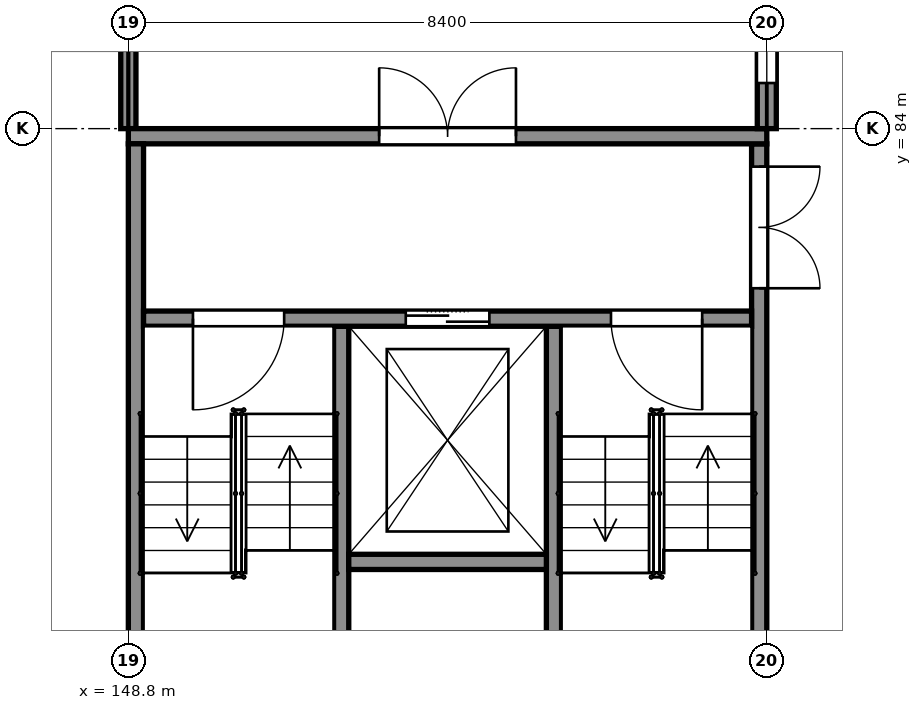
"""IFC4 building model, lengths in metres.
Left out: names, types, materials, properties, quantities, classifications, styles, units other than length and angle.
Written with IfcOpenShell. Run it as: python <this file> out.ifc"""

import sys

from ifc_helpers import new_model, si_unit, direction, frame, frame_2d, origin, place, context, subcontext, project, spatial, rectangle, extrude, element, fill, save


model = new_model("IFC4")
c1 = context("Model", 3, precision=1e-05, world=origin(), true_north=direction((0.0, 1.0)))
c2 = subcontext(c1, "Body", "Model", "MODEL_VIEW")
j1 = project(units=[si_unit("LENGTHUNIT", "METRE"), si_unit("PLANEANGLEUNIT", "RADIAN")], contexts=[c1])
p1 = place(None, origin())
s1 = spatial("IfcSite", under=j1, at=p1, CompositionType="ELEMENT")
p2 = place(p1, origin())
s2 = spatial("IfcBuilding", under=s1, at=p2, CompositionType="ELEMENT")
p3 = place(p2, origin())
s3 = spatial("IfcBuildingStorey", under=s2, at=p3, CompositionType="ELEMENT", Elevation=0.0)
p4 = place(p3, frame((148.8, 83.9, -1.8), z_axis=(0.0, 0.0, 1.0), x_axis=(1.0, 0.0, 0.0)))
e1 = element("IfcWall", 1, at=p4, inside=s3, PredefinedType="SHEAR", context=c2, shape_type="SweptSolid", body=[
    extrude(rectangle(XDim=8.4, YDim=0.2, at=frame_2d((4.2, 0.0))), origin(), (0.0, 0.0, 1.0), 7.3),
])
p5 = place(p4, frame((3.3, 0.0, 1.8)))
e2 = element("IfcOpeningElement", 2, at=p5, cuts=e1, PredefinedType="OPENING", context=c2, shape_type="SweptSolid", body=[
    extrude(rectangle(XDim=1.8, YDim=2.1, at=frame_2d((0.9, 1.05))), frame((0.0, 0.11, 0.0), z_axis=(0.0, -1.0, 0.0), x_axis=(1.0, 0.0, 0.0)), (0.0, 0.0, 1.0), 0.22),
])
p6 = place(p3, frame((148.9, 75.8, -1.8), z_axis=(0.0, 0.0, 1.0), x_axis=(0.0, 1.0, 0.0)))
e3 = element("IfcWall", 3, at=p6, inside=s3, PredefinedType="SHEAR", context=c2, shape_type="SweptSolid", body=[
    extrude(rectangle(XDim=8.0, YDim=0.2, at=frame_2d((4.0, 0.0))), origin(), (0.0, 0.0, 1.0), 7.3),
])
p7 = place(p3, frame((157.1, 83.8, -1.8), z_axis=(0.0, 0.0, 1.0), x_axis=(0.0, -1.0, 0.0)))
e4 = element("IfcWall", 4, at=p7, inside=s3, PredefinedType="SHEAR", context=c2, shape_type="SweptSolid", body=[
    extrude(rectangle(XDim=8.0, YDim=0.2, at=frame_2d((4.0, 0.0))), origin(), (0.0, 0.0, 1.0), 7.3),
])
p8 = place(p7, frame((0.3, 0.0, 1.8)))
e5 = element("IfcOpeningElement", 5, at=p8, cuts=e4, PredefinedType="OPENING", context=c2, shape_type="SweptSolid", body=[
    extrude(rectangle(XDim=1.6, YDim=2.1, at=frame_2d((0.8, 1.05))), frame((0.0, 0.11, 0.0), z_axis=(0.0, -1.0, 0.0), x_axis=(1.0, 0.0, 0.0)), (0.0, 0.0, 1.0), 0.22),
])
p9 = place(p3, frame((149.0, 81.5, -1.8), z_axis=(0.0, 0.0, 1.0), x_axis=(1.0, 0.0, 0.0)))
e6 = element("IfcWall", 6, at=p9, inside=s3, PredefinedType="SHEAR", context=c2, shape_type="SweptSolid", body=[
    extrude(rectangle(XDim=8.0, YDim=0.2, at=frame_2d((4.0, 0.0))), origin(), (0.0, 0.0, 1.0), 7.3),
])
p10 = place(p9, frame((0.65, 0.0, 1.8)))
e7 = element("IfcOpeningElement", 7, at=p10, cuts=e6, PredefinedType="OPENING", context=c2, shape_type="SweptSolid", body=[
    extrude(rectangle(XDim=1.2, YDim=2.1, at=frame_2d((0.6, 1.05))), frame((0.0, 0.11, 0.0), z_axis=(0.0, -1.0, 0.0), x_axis=(1.0, 0.0, 0.0)), (0.0, 0.0, 1.0), 0.22),
])
p11 = place(p9, frame((6.15, 0.0, 1.8)))
e8 = element("IfcOpeningElement", 8, at=p11, cuts=e6, PredefinedType="OPENING", context=c2, shape_type="SweptSolid", body=[
    extrude(rectangle(XDim=1.2, YDim=2.1, at=frame_2d((0.6, 1.05))), frame((0.0, 0.11, 0.0), z_axis=(0.0, -1.0, 0.0), x_axis=(1.0, 0.0, 0.0)), (0.0, 0.0, 1.0), 0.22),
])
p12 = place(p9, frame((3.45, 0.0, 1.8)))
e9 = element("IfcOpeningElement", 9, at=p12, cuts=e6, PredefinedType="OPENING", context=c2, shape_type="SweptSolid", body=[
    extrude(rectangle(XDim=1.1, YDim=2.1, at=frame_2d((0.55, 1.05))), frame((0.0, 0.11, 0.0), z_axis=(0.0, -1.0, 0.0), x_axis=(1.0, 0.0, 0.0)), (0.0, 0.0, 1.0), 0.22),
])
for number, where, z_axis, x_axis in (
    (10, (151.6, 75.8, -1.8), (0.0, 0.0, 1.0), (0.0, 1.0, 0.0)),
    (11, (154.4, 75.8, -1.8), (0.0, 0.0, 1.0), (0.0, 1.0, 0.0)),
):
    element("IfcWall", number, at=place(p3, frame(where, z_axis=z_axis, x_axis=x_axis)), inside=s3, PredefinedType="SHEAR", context=c2, shape_type="SweptSolid", body=[
        extrude(rectangle(XDim=5.6, YDim=0.2, at=frame_2d((2.8, 0.0))), origin(), (0.0, 0.0, 1.0), 7.3),
    ])
p13 = place(p3, frame((151.7, 78.3, -1.8), z_axis=(0.0, 0.0, 1.0), x_axis=(1.0, 0.0, 0.0)))
e12 = element("IfcWall", 12, at=p13, inside=s3, PredefinedType="SHEAR", context=c2, shape_type="SweptSolid", body=[
    extrude(rectangle(XDim=2.6, YDim=0.2, at=frame_2d((1.3, 0.0))), origin(), (0.0, 0.0, 1.0), 7.3),
])
p14 = place(p3, frame((157.2, 84.0, 0.0), z_axis=(0.0, 0.0, 1.0), x_axis=(0.0, 1.0, 0.0)))
e13 = element("IfcWall", 13, at=p14, inside=s3, PredefinedType="SOLIDWALL", context=c2, shape_type="SweptSolid", body=[
    extrude(rectangle(XDim=8.0, YDim=0.25, at=frame_2d((4.0, 0.0))), origin(), (0.0, 0.0, 1.0), 4.44),
])
p15 = place(p14, frame((0.6, 0.0, 0.9)))
e14 = element("IfcOpeningElement", 14, at=p15, cuts=e13, PredefinedType="OPENING", context=c2, shape_type="SweptSolid", body=[
    extrude(rectangle(XDim=1.2, YDim=2.1, at=frame_2d((0.6, 1.05))), frame((0.0, 0.135, 0.0), z_axis=(0.0, -1.0, 0.0), x_axis=(1.0, 0.0, 0.0)), (0.0, 0.0, 1.0), 0.27),
])
p16 = place(p14, frame((3.4, 0.0, 0.9)))
e15 = element("IfcOpeningElement", 15, at=p16, cuts=e13, PredefinedType="OPENING", context=c2, shape_type="SweptSolid", body=[
    extrude(rectangle(XDim=1.2, YDim=2.1, at=frame_2d((0.6, 1.05))), frame((0.0, 0.135, 0.0), z_axis=(0.0, -1.0, 0.0), x_axis=(1.0, 0.0, 0.0)), (0.0, 0.0, 1.0), 0.27),
])
p17 = place(p14, frame((6.2, 0.0, 0.9)))
e16 = element("IfcOpeningElement", 16, at=p17, cuts=e13, PredefinedType="OPENING", context=c2, shape_type="SweptSolid", body=[
    extrude(rectangle(XDim=1.2, YDim=2.1, at=frame_2d((0.6, 1.05))), frame((0.0, 0.135, 0.0), z_axis=(0.0, -1.0, 0.0), x_axis=(1.0, 0.0, 0.0)), (0.0, 0.0, 1.0), 0.27),
])
p18 = place(p3, frame((148.8, 84.0, 0.0), z_axis=(0.0, 0.0, 1.0), x_axis=(0.0, 1.0, 0.0)))
e17 = element("IfcWall", 17, at=p18, inside=s3, PredefinedType="PARTITIONING", context=c2, shape_type="SweptSolid", body=[
    extrude(rectangle(XDim=8.0, YDim=0.2, at=frame_2d((4.0, 0.0))), origin(), (0.0, 0.0, 1.0), 4.4),
])
p19 = place(p18, frame((1.025, 0.0, 0.0)))
e18 = element("IfcOpeningElement", 18, at=p19, cuts=e17, PredefinedType="OPENING", context=c2, shape_type="SweptSolid", body=[
    extrude(rectangle(XDim=2.4, YDim=2.4, at=frame_2d((1.2, 1.2))), frame((0.0, 0.11, 0.0), z_axis=(0.0, -1.0, 0.0), x_axis=(1.0, 0.0, 0.0)), (0.0, 0.0, 1.0), 0.22),
])
p20 = place(p15, origin())
e19 = element("IfcWindow", 19, at=p20, inside=s3, PartitioningType="SINGLE_PANEL", PredefinedType="WINDOW", context=c2, shape_type="SweptSolid", body=[
    extrude(rectangle(XDim=1.2, YDim=2.1, at=frame_2d((0.6, 1.05))), frame((0.0, 0.105, 0.0), z_axis=(0.0, -1.0, 0.0), x_axis=(1.0, 0.0, 0.0)), (0.0, 0.0, 1.0), 0.06),
])
fill(e14, e19)
p21 = place(p8, origin())
e20 = element("IfcDoor", 20, at=p21, inside=s3, OperationType="DOUBLE_DOOR_SINGLE_SWING", PredefinedType="DOOR", context=c2, shape_type="SweptSolid", body=[
    extrude(rectangle(XDim=1.6, YDim=2.1, at=frame_2d((0.8, 1.05))), frame((0.0, 0.025, 0.0), z_axis=(0.0, -1.0, 0.0), x_axis=(1.0, 0.0, 0.0)), (0.0, 0.0, 1.0), 0.05),
])
fill(e5, e20)
p22 = place(p5, origin())
e21 = element("IfcDoor", 21, at=p22, inside=s3, OperationType="DOUBLE_DOOR_SINGLE_SWING", PredefinedType="DOOR", context=c2, shape_type="SweptSolid", body=[
    extrude(rectangle(XDim=1.8, YDim=2.1, at=frame_2d((0.9, 1.05))), frame((0.0, 0.025, 0.0), z_axis=(0.0, -1.0, 0.0), x_axis=(1.0, 0.0, 0.0)), (0.0, 0.0, 1.0), 0.05),
])
fill(e2, e21)
p23 = place(p10, origin())
e22 = element("IfcDoor", 22, at=p23, inside=s3, OperationType="SINGLE_SWING_LEFT", PredefinedType="DOOR", context=c2, shape_type="SweptSolid", body=[
    extrude(rectangle(XDim=1.2, YDim=2.1, at=frame_2d((0.6, 1.05))), frame((0.0, 0.025, 0.0), z_axis=(0.0, -1.0, 0.0), x_axis=(1.0, 0.0, 0.0)), (0.0, 0.0, 1.0), 0.05),
])
fill(e7, e22)
p24 = place(p11, origin())
e23 = element("IfcDoor", 23, at=p24, inside=s3, OperationType="SINGLE_SWING_RIGHT", PredefinedType="DOOR", context=c2, shape_type="SweptSolid", body=[
    extrude(rectangle(XDim=1.2, YDim=2.1, at=frame_2d((0.6, 1.05))), frame((0.0, 0.025, 0.0), z_axis=(0.0, -1.0, 0.0), x_axis=(1.0, 0.0, 0.0)), (0.0, 0.0, 1.0), 0.05),
])
fill(e8, e23)
p25 = place(p12, origin())
e24 = element("IfcDoor", 24, at=p25, inside=s3, OperationType="DOUBLE_DOOR_SLIDING", PredefinedType="DOOR", context=c2, shape_type="SweptSolid", body=[
    extrude(rectangle(XDim=1.1, YDim=2.1, at=frame_2d((0.55, 1.05))), frame((0.0, 0.025, 0.0), z_axis=(0.0, -1.0, 0.0), x_axis=(1.0, 0.0, 0.0)), (0.0, 0.0, 1.0), 0.05),
])
fill(e9, e24)
save(model, sys.argv[1])
